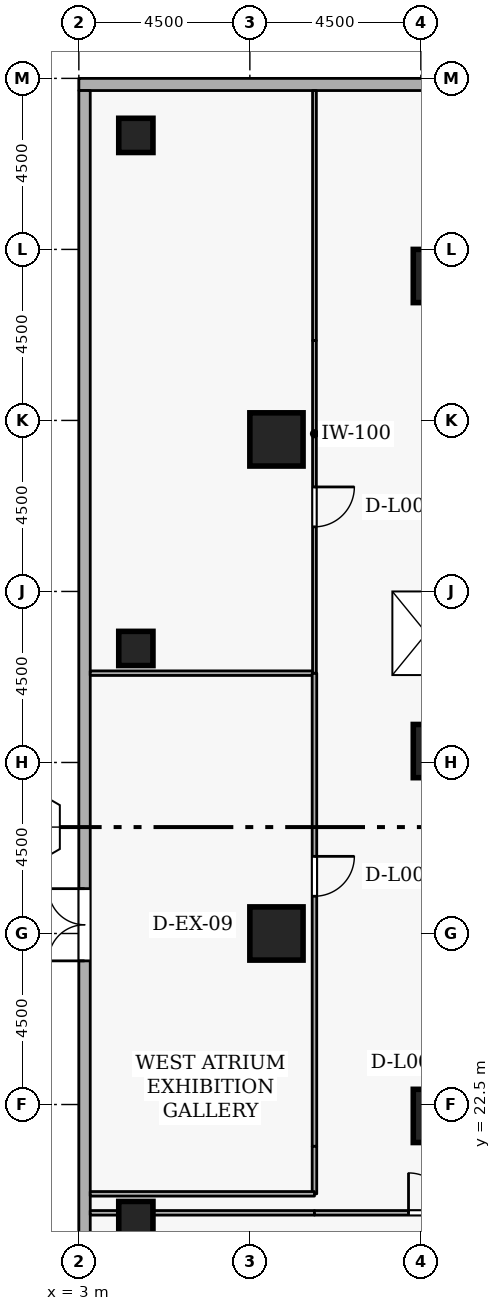
"""IFC4 building model, lengths in metres.
Left out: names, types, materials, properties, quantities, classifications, styles, units other than length and angle.
Written with IfcOpenShell. Run it as: python <this file> out.ifc"""

import sys

from ifc_helpers import new_model, si_unit, direction, frame, frame_2d, origin, origin_2d, place, context, subcontext, project, spatial, rectangle, extrude, element, fill, save


model = new_model("IFC4")
c1 = context("Model", 3, precision=1e-05, world=origin(), true_north=direction((0.0, 1.0)))
c2 = subcontext(c1, "Body", "Model", "MODEL_VIEW")
j1 = project(units=[si_unit("LENGTHUNIT", "METRE"), si_unit("PLANEANGLEUNIT", "RADIAN")], contexts=[c1])
p1 = place(None, origin())
s1 = spatial("IfcSite", under=j1, at=p1, CompositionType="ELEMENT")
p2 = place(p1, origin())
s2 = spatial("IfcBuilding", under=s1, at=p2, CompositionType="ELEMENT")
p3 = place(p2, origin())
s3 = spatial("IfcBuildingStorey", under=s2, at=p3, CompositionType="ELEMENT", Elevation=0.0)
for number, where, z_axis, x_axis in (
    (1, (12.5, 44.3, 0.0), (0.0, 0.0, 1.0), (1.0, 0.0, 0.0)),
    (2, (8.2, 27.0, 0.0), (0.0, 0.0, 1.0), (1.0, 0.0, 0.0)),
    (3, (8.2, 40.0, 0.0), (0.0, 0.0, 1.0), (1.0, 0.0, 0.0)),
    (4, (12.5, 22.2, 0.0), (0.0, 0.0, 1.0), (1.0, 0.0, 0.0)),
    (5, (12.5, 31.8, 0.0), (0.0, 0.0, 1.0), (1.0, 0.0, 0.0)),
):
    element("IfcColumn", number, at=place(p3, frame(where, z_axis=z_axis, x_axis=x_axis)), inside=s3, PredefinedType="COLUMN", context=c2, shape_type="SweptSolid", body=[
        extrude(rectangle(XDim=1.4, YDim=1.4, at=origin_2d()), origin(), (0.0, 0.0, 1.0), 4.8),
    ])
for number, where, z_axis, x_axis in (
    (6, (4.5, 19.5, 0.0), (0.0, 0.0, 1.0), (1.0, 0.0, 0.0)),
    (7, (4.5, 34.5, 0.0), (0.0, 0.0, 1.0), (1.0, 0.0, 0.0)),
    (8, (4.5, 48.0, 0.0), (0.0, 0.0, 1.0), (1.0, 0.0, 0.0)),
):
    element("IfcColumn", number, at=place(p3, frame(where, z_axis=z_axis, x_axis=x_axis)), inside=s3, PredefinedType="COLUMN", context=c2, shape_type="SweptSolid", body=[
        extrude(rectangle(XDim=0.9, YDim=0.9, at=origin_2d()), origin(), (0.0, 0.0, 1.0), 4.8),
    ])
p4 = place(p3, frame((42.4, 49.34, 0.0), z_axis=(0.0, 0.0, 1.0), x_axis=(-1.0, 0.0, 0.0)))
e9 = element("IfcWall", 9, at=p4, inside=s3, PredefinedType="STANDARD", context=c2, shape_type="SweptSolid", body=[
    extrude(rectangle(XDim=39.4, YDim=0.32, at=frame_2d((19.7, 0.0))), origin(), (0.0, 0.0, 1.0), 3.86),
])
p5 = place(p4, frame((8.95, 0.0, 0.0), z_axis=(0.0, 0.0, 1.0), x_axis=(-1.0, 0.0, 0.0)))
e10 = element("IfcOpeningElement", 10, at=p5, cuts=e9, PredefinedType="OPENING", context=c2, shape_type="SweptSolid", body=[
    extrude(rectangle(XDim=1.9, YDim=2.25, at=frame_2d((0.95, 1.125))), frame((0.0, 0.17, 0.0), z_axis=(0.0, -1.0, 0.0), x_axis=(1.0, 0.0, 0.0)), (0.0, 0.0, 1.0), 0.34),
])
p6 = place(p4, frame((12.8, 0.0, 0.78)))
e11 = element("IfcOpeningElement", 11, at=p6, cuts=e9, PredefinedType="OPENING", context=c2, shape_type="SweptSolid", body=[
    extrude(rectangle(XDim=2.1, YDim=2.4, at=frame_2d((1.05, 1.2))), frame((0.0, 0.17, 0.0), z_axis=(0.0, -1.0, 0.0), x_axis=(1.0, 0.0, 0.0)), (0.0, 0.0, 1.0), 0.34),
])
p7 = place(p4, frame((22.8, 0.0, 0.78)))
e12 = element("IfcOpeningElement", 12, at=p7, cuts=e9, PredefinedType="OPENING", context=c2, shape_type="SweptSolid", body=[
    extrude(rectangle(XDim=2.1, YDim=2.4, at=frame_2d((1.05, 1.2))), frame((0.0, 0.17, 0.0), z_axis=(0.0, -1.0, 0.0), x_axis=(1.0, 0.0, 0.0)), (0.0, 0.0, 1.0), 0.34),
])
p8 = place(p3, frame((3.15, 49.18, 0.0), z_axis=(0.0, 0.0, 1.0), x_axis=(0.0, -1.0, 0.0)))
e13 = element("IfcWall", 13, at=p8, inside=s3, PredefinedType="STANDARD", context=c2, shape_type="SweptSolid", body=[
    extrude(rectangle(XDim=44.36, YDim=0.3, at=frame_2d((22.18, 0.0))), origin(), (0.0, 0.0, 1.0), 3.86),
])
p9 = place(p8, frame((22.9, 0.0, 0.0), z_axis=(0.0, 0.0, 1.0), x_axis=(-1.0, 0.0, 0.0)))
e14 = element("IfcOpeningElement", 14, at=p9, cuts=e13, PredefinedType="OPENING", context=c2, shape_type="SweptSolid", body=[
    extrude(rectangle(XDim=1.9, YDim=2.25, at=frame_2d((0.95, 1.125))), frame((0.0, 0.16, 0.0), z_axis=(0.0, -1.0, 0.0), x_axis=(1.0, 0.0, 0.0)), (0.0, 0.0, 1.0), 0.32),
])
p10 = place(p3, frame((3.3, 19.65, 0.0), z_axis=(0.0, 0.0, 1.0), x_axis=(1.0, 0.0, 0.0)))
e15 = element("IfcWall", 15, at=p10, inside=s3, PredefinedType="PARTITIONING", context=c2, shape_type="SweptSolid", body=[
    extrude(rectangle(XDim=5.9, YDim=0.12, at=frame_2d((2.95, 0.0))), origin(), (0.0, 0.0, 1.0), 4.46),
])
p11 = place(p3, frame((9.2, 19.65, 0.0), z_axis=(0.0, 0.0, 1.0), x_axis=(1.0, 0.0, 0.0)))
e16 = element("IfcWall", 16, at=p11, inside=s3, PredefinedType="PARTITIONING", context=c2, shape_type="SweptSolid", body=[
    extrude(rectangle(XDim=6.0, YDim=0.12, at=frame_2d((3.0, 0.0))), origin(), (0.0, 0.0, 1.0), 4.46),
])
p12 = place(p11, frame((2.475, 0.0, 0.0)))
e17 = element("IfcOpeningElement", 17, at=p12, cuts=e16, PredefinedType="OPENING", context=c2, shape_type="SweptSolid", body=[
    extrude(rectangle(XDim=1.05, YDim=2.1, at=frame_2d((0.525, 1.05))), frame((0.0, 0.07, 0.0), z_axis=(0.0, -1.0, 0.0), x_axis=(1.0, 0.0, 0.0)), (0.0, 0.0, 1.0), 0.14),
])
p13 = place(p3, frame((3.3, 33.85, 0.0), z_axis=(0.0, 0.0, 1.0), x_axis=(1.0, 0.0, 0.0)))
e18 = element("IfcWall", 18, at=p13, inside=s3, PredefinedType="PARTITIONING", context=c2, shape_type="SweptSolid", body=[
    extrude(rectangle(XDim=5.9, YDim=0.12, at=frame_2d((2.95, 0.0))), origin(), (0.0, 0.0, 1.0), 4.46),
])
p14 = place(p3, frame((9.2, 33.85, 0.0), z_axis=(0.0, 0.0, 1.0), x_axis=(0.0, -1.0, 0.0)))
e19 = element("IfcWall", 19, at=p14, inside=s3, PredefinedType="PARTITIONING", context=c2, shape_type="SweptSolid", body=[
    extrude(rectangle(XDim=12.45, YDim=0.12, at=frame_2d((6.225, 0.0))), origin(), (0.0, 0.0, 1.0), 4.46),
])
p15 = place(p14, frame((4.82, 0.0, 0.0)))
e20 = element("IfcOpeningElement", 20, at=p15, cuts=e19, PredefinedType="OPENING", context=c2, shape_type="SweptSolid", body=[
    extrude(rectangle(XDim=1.05, YDim=2.1, at=frame_2d((0.525, 1.05))), frame((0.0, 0.07, 0.0), z_axis=(0.0, -1.0, 0.0), x_axis=(1.0, 0.0, 0.0)), (0.0, 0.0, 1.0), 0.14),
])
p16 = place(p3, frame((9.2, 21.4, 0.0), z_axis=(0.0, 0.0, 1.0), x_axis=(0.0, -1.0, 0.0)))
e21 = element("IfcWall", 21, at=p16, inside=s3, PredefinedType="PARTITIONING", context=c2, shape_type="SweptSolid", body=[
    extrude(rectangle(XDim=1.25, YDim=0.12, at=frame_2d((0.625, 0.0))), origin(), (0.0, 0.0, 1.0), 4.46),
])
p17 = place(p3, frame((9.2, 20.15, 0.0), z_axis=(0.0, 0.0, 1.0), x_axis=(-1.0, 0.0, 0.0)))
e22 = element("IfcWall", 22, at=p17, inside=s3, PredefinedType="PARTITIONING", context=c2, shape_type="SweptSolid", body=[
    extrude(rectangle(XDim=5.9, YDim=0.12, at=frame_2d((2.95, 0.0))), origin(), (0.0, 0.0, 1.0), 4.46),
])
p18 = place(p3, frame((9.2, 49.18, 0.0), z_axis=(0.0, 0.0, 1.0), x_axis=(0.0, -1.0, 0.0)))
e23 = element("IfcWall", 23, at=p18, inside=s3, PredefinedType="PARTITIONING", context=c2, shape_type="SweptSolid", body=[
    extrude(rectangle(XDim=6.58, YDim=0.1, at=frame_2d((3.29, 0.0))), origin(), (0.0, 0.0, 1.0), 4.46),
])
p19 = place(p3, frame((9.2, 42.6, 0.0), z_axis=(0.0, 0.0, 1.0), x_axis=(0.0, -1.0, 0.0)))
e24 = element("IfcWall", 24, at=p19, inside=s3, PredefinedType="PARTITIONING", context=c2, shape_type="SweptSolid", body=[
    extrude(rectangle(XDim=8.75, YDim=0.1, at=frame_2d((4.375, 0.0))), origin(), (0.0, 0.0, 1.0), 4.46),
])
p20 = place(p19, frame((3.85, 0.0, 0.0)))
e25 = element("IfcOpeningElement", 25, at=p20, cuts=e24, PredefinedType="OPENING", context=c2, shape_type="SweptSolid", body=[
    extrude(rectangle(XDim=1.05, YDim=2.1, at=frame_2d((0.525, 1.05))), frame((0.0, 0.06, 0.0), z_axis=(0.0, -1.0, 0.0), x_axis=(1.0, 0.0, 0.0)), (0.0, 0.0, 1.0), 0.12),
])
p21 = place(p9, origin())
e26 = element("IfcDoor", 26, at=p21, inside=s3, OperationType="DOUBLE_DOOR_SINGLE_SWING", PredefinedType="DOOR", context=c2, shape_type="SweptSolid", body=[
    extrude(rectangle(XDim=1.9, YDim=2.25, at=frame_2d((0.95, 1.125))), frame((0.0, 0.025, 0.0), z_axis=(0.0, -1.0, 0.0), x_axis=(1.0, 0.0, 0.0)), (0.0, 0.0, 1.0), 0.05),
])
fill(e14, e26)
p22 = place(p12, origin())
e27 = element("IfcDoor", 27, at=p22, inside=s3, OperationType="SINGLE_SWING_LEFT", PredefinedType="DOOR", context=c2, shape_type="SweptSolid", body=[
    extrude(rectangle(XDim=1.05, YDim=2.1, at=frame_2d((0.525, 1.05))), frame((0.0, 0.025, 0.0), z_axis=(0.0, -1.0, 0.0), x_axis=(1.0, 0.0, 0.0)), (0.0, 0.0, 1.0), 0.05),
])
fill(e17, e27)
p23 = place(p15, origin())
e28 = element("IfcDoor", 28, at=p23, inside=s3, OperationType="SINGLE_SWING_LEFT", PredefinedType="DOOR", context=c2, shape_type="SweptSolid", body=[
    extrude(rectangle(XDim=1.05, YDim=2.1, at=frame_2d((0.525, 1.05))), frame((0.0, 0.025, 0.0), z_axis=(0.0, -1.0, 0.0), x_axis=(1.0, 0.0, 0.0)), (0.0, 0.0, 1.0), 0.05),
])
fill(e20, e28)
p24 = place(p20, origin())
e29 = element("IfcDoor", 29, at=p24, inside=s3, OperationType="SINGLE_SWING_LEFT", PredefinedType="DOOR", context=c2, shape_type="SweptSolid", body=[
    extrude(rectangle(XDim=1.05, YDim=2.1, at=frame_2d((0.525, 1.05))), frame((0.0, 0.025, 0.0), z_axis=(0.0, -1.0, 0.0), x_axis=(1.0, 0.0, 0.0)), (0.0, 0.0, 1.0), 0.05),
])
fill(e25, e29)
save(model, sys.argv[1])
